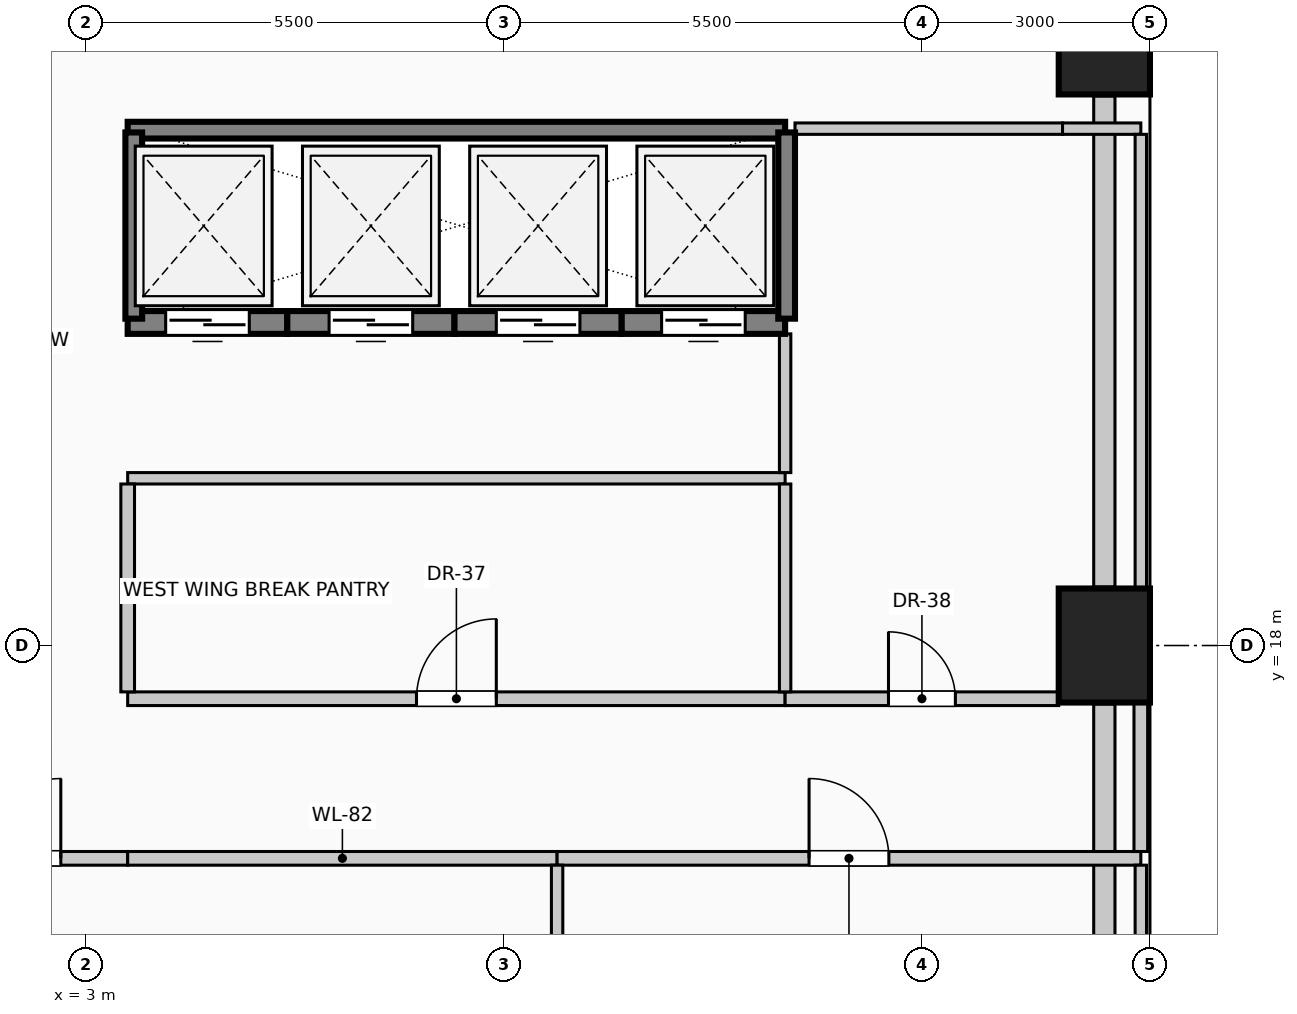
"""IFC4 building model, lengths in metres.
Left out: names, types, materials, properties, quantities, classifications, styles, units other than length and angle.
Written with IfcOpenShell. Run it as: python <this file> out.ifc"""

import sys

from ifc_helpers import new_model, si_unit, direction, frame, frame_2d, origin, origin_2d, place, context, subcontext, project, spatial, rectangle, extrude, element, fill, save


model = new_model("IFC4")
c1 = context("Model", 3, precision=1e-05, world=origin(), true_north=direction((0.0, 1.0)))
c2 = subcontext(c1, "Body", "Model", "MODEL_VIEW")
j1 = project(units=[si_unit("LENGTHUNIT", "METRE"), si_unit("PLANEANGLEUNIT", "RADIAN")], contexts=[c1])
p1 = place(None, origin())
s1 = spatial("IfcSite", under=j1, at=p1, CompositionType="ELEMENT")
p2 = place(p1, origin())
s2 = spatial("IfcBuilding", under=s1, at=p2, CompositionType="ELEMENT")
p3 = place(p2, frame((0.0, 0.0, 26.6)))
s3 = spatial("IfcBuildingStorey", under=s2, at=p3, CompositionType="ELEMENT", Elevation=26.6)
for number, where, z_axis, x_axis in (
    (1, (16.4, 18.0, 0.0), (0.0, 0.0, 1.0), (1.0, 0.0, 0.0)),
    (2, (16.4, 26.0, 0.0), (0.0, 0.0, 1.0), (1.0, 0.0, 0.0)),
):
    element("IfcColumn", number, at=place(p3, frame(where, z_axis=z_axis, x_axis=x_axis)), inside=s3, PredefinedType="COLUMN", context=c2, shape_type="SweptSolid", body=[
        extrude(rectangle(XDim=1.2, YDim=1.5, at=origin_2d()), origin(), (0.0, 0.0, 1.0), 4.0),
    ])
p4 = place(p3, frame((16.4, 17.23, 0.0), z_axis=(0.0, 0.0, 1.0), x_axis=(0.0, -1.0, 0.0)))
e3 = element("IfcWall", 3, at=p4, inside=s3, PredefinedType="SOLIDWALL", context=c2, shape_type="SweptSolid", body=[
    extrude(rectangle(XDim=6.46, YDim=0.28, at=frame_2d((3.23, 0.0))), origin(), (0.0, 0.0, 1.0), 3.0),
])
p5 = place(p4, frame((3.573, 0.0, 0.42)))
e4 = element("IfcOpeningElement", 4, at=p5, cuts=e3, PredefinedType="OPENING", context=c2, shape_type="SweptSolid", body=[
    extrude(rectangle(XDim=2.2, YDim=1.95, at=frame_2d((1.1, 0.975))), frame((0.0, 0.15, 0.0), z_axis=(0.0, -1.0, 0.0), x_axis=(1.0, 0.0, 0.0)), (0.0, 0.0, 1.0), 0.3),
])
p6 = place(p3, frame((16.4, 25.23, 0.0), z_axis=(0.0, 0.0, 1.0), x_axis=(0.0, -1.0, 0.0)))
e5 = element("IfcWall", 5, at=p6, inside=s3, PredefinedType="SOLIDWALL", context=c2, shape_type="SweptSolid", body=[
    extrude(rectangle(XDim=6.46, YDim=0.28, at=frame_2d((3.23, 0.0))), origin(), (0.0, 0.0, 1.0), 3.0),
])
p7 = place(p3, frame((5.65, 22.25, 0.0), z_axis=(0.0, 0.0, 1.0), x_axis=(-1.0, 0.0, 0.0)))
e6 = element("IfcWall", 6, at=p7, inside=s3, PredefinedType="SOLIDWALL", context=c2, shape_type="SweptSolid", body=[
    extrude(rectangle(XDim=2.1, YDim=0.3, at=frame_2d((1.05, 0.0))), origin(), (0.0, 0.0, 1.0), 4.0),
])
p8 = place(p7, frame((0.5, 0.0, 0.0)))
e7 = element("IfcOpeningElement", 7, at=p8, cuts=e6, PredefinedType="OPENING", context=c2, shape_type="SweptSolid", body=[
    extrude(rectangle(XDim=1.1, YDim=2.2, at=frame_2d((0.55, 1.1))), frame((0.0, 0.16, 0.0), z_axis=(0.0, -1.0, 0.0), x_axis=(1.0, 0.0, 0.0)), (0.0, 0.0, 1.0), 0.32),
])
p9 = place(p3, frame((7.85, 22.25, 0.0), z_axis=(0.0, 0.0, 1.0), x_axis=(-1.0, 0.0, 0.0)))
e8 = element("IfcWall", 8, at=p9, inside=s3, PredefinedType="SOLIDWALL", context=c2, shape_type="SweptSolid", body=[
    extrude(rectangle(XDim=2.2, YDim=0.3, at=frame_2d((1.1, 0.0))), origin(), (0.0, 0.0, 1.0), 4.0),
])
p10 = place(p9, frame((0.55, 0.0, 0.0)))
e9 = element("IfcOpeningElement", 9, at=p10, cuts=e8, PredefinedType="OPENING", context=c2, shape_type="SweptSolid", body=[
    extrude(rectangle(XDim=1.1, YDim=2.2, at=frame_2d((0.55, 1.1))), frame((0.0, 0.16, 0.0), z_axis=(0.0, -1.0, 0.0), x_axis=(1.0, 0.0, 0.0)), (0.0, 0.0, 1.0), 0.32),
])
p11 = place(p3, frame((10.05, 22.25, 0.0), z_axis=(0.0, 0.0, 1.0), x_axis=(-1.0, 0.0, 0.0)))
e10 = element("IfcWall", 10, at=p11, inside=s3, PredefinedType="SOLIDWALL", context=c2, shape_type="SweptSolid", body=[
    extrude(rectangle(XDim=2.2, YDim=0.3, at=frame_2d((1.1, 0.0))), origin(), (0.0, 0.0, 1.0), 4.0),
])
p12 = place(p11, frame((0.55, 0.0, 0.0)))
e11 = element("IfcOpeningElement", 11, at=p12, cuts=e10, PredefinedType="OPENING", context=c2, shape_type="SweptSolid", body=[
    extrude(rectangle(XDim=1.1, YDim=2.2, at=frame_2d((0.55, 1.1))), frame((0.0, 0.16, 0.0), z_axis=(0.0, -1.0, 0.0), x_axis=(1.0, 0.0, 0.0)), (0.0, 0.0, 1.0), 0.32),
])
p13 = place(p3, frame((12.2, 22.25, 0.0), z_axis=(0.0, 0.0, 1.0), x_axis=(-1.0, 0.0, 0.0)))
e12 = element("IfcWall", 12, at=p13, inside=s3, PredefinedType="SOLIDWALL", context=c2, shape_type="SweptSolid", body=[
    extrude(rectangle(XDim=2.15, YDim=0.3, at=frame_2d((1.075, 0.0))), origin(), (0.0, 0.0, 1.0), 4.0),
])
p14 = place(p13, frame((0.525, 0.0, 0.0)))
e13 = element("IfcOpeningElement", 13, at=p14, cuts=e12, PredefinedType="OPENING", context=c2, shape_type="SweptSolid", body=[
    extrude(rectangle(XDim=1.1, YDim=2.2, at=frame_2d((0.55, 1.1))), frame((0.0, 0.16, 0.0), z_axis=(0.0, -1.0, 0.0), x_axis=(1.0, 0.0, 0.0)), (0.0, 0.0, 1.0), 0.32),
])
p15 = place(p3, frame((3.55, 24.78, 0.0), z_axis=(0.0, 0.0, 1.0), x_axis=(1.0, 0.0, 0.0)))
e14 = element("IfcWall", 14, at=p15, inside=s3, PredefinedType="SOLIDWALL", context=c2, shape_type="SweptSolid", body=[
    extrude(rectangle(XDim=8.65, YDim=0.22, at=frame_2d((4.325, 0.0))), origin(), (0.0, 0.0, 1.0), 4.0),
])
for number, where, z_axis, x_axis in (
    (15, (3.63, 22.3, 0.0), (0.0, 0.0, 1.0), (0.0, 1.0, 0.0)),
    (16, (12.22, 22.3, 0.0), (0.0, 0.0, 1.0), (0.0, 1.0, 0.0)),
):
    element("IfcWall", number, at=place(p3, frame(where, z_axis=z_axis, x_axis=x_axis)), inside=s3, PredefinedType="SOLIDWALL", context=c2, shape_type="SweptSolid", body=[
        extrude(rectangle(XDim=2.45, YDim=0.22, at=frame_2d((1.225, 0.0))), origin(), (0.0, 0.0, 1.0), 4.0),
    ])
p16 = place(p3, frame((0.74, 15.2, 0.0), z_axis=(0.0, 0.0, 1.0), x_axis=(1.0, 0.0, 0.0)))
e17 = element("IfcWall", 17, at=p16, inside=s3, PredefinedType="PARTITIONING", context=c2, shape_type="SweptSolid", body=[
    extrude(rectangle(XDim=2.81, YDim=0.18, at=frame_2d((1.405, 0.0))), origin(), (0.0, 0.0, 1.0), 3.7),
])
p17 = place(p16, frame((0.88, 0.0, 0.0)))
e18 = element("IfcOpeningElement", 18, at=p17, cuts=e17, PredefinedType="OPENING", context=c2, shape_type="SweptSolid", body=[
    extrude(rectangle(XDim=1.05, YDim=2.15, at=frame_2d((0.525, 1.075))), frame((0.0, 0.1, 0.0), z_axis=(0.0, -1.0, 0.0), x_axis=(1.0, 0.0, 0.0)), (0.0, 0.0, 1.0), 0.2),
])
p18 = place(p3, frame((3.55, 15.2, 0.0), z_axis=(0.0, 0.0, 1.0), x_axis=(1.0, 0.0, 0.0)))
e19 = element("IfcWall", 19, at=p18, inside=s3, PredefinedType="PARTITIONING", context=c2, shape_type="SweptSolid", body=[
    extrude(rectangle(XDim=5.65, YDim=0.18, at=frame_2d((2.825, 0.0))), origin(), (0.0, 0.0, 1.0), 3.7),
])
p19 = place(p3, frame((9.2, 15.2, 0.0), z_axis=(0.0, 0.0, 1.0), x_axis=(1.0, 0.0, 0.0)))
e20 = element("IfcWall", 20, at=p19, inside=s3, PredefinedType="PARTITIONING", context=c2, shape_type="SweptSolid", body=[
    extrude(rectangle(XDim=7.68, YDim=0.18, at=frame_2d((3.84, 0.0))), origin(), (0.0, 0.0, 1.0), 3.7),
])
p20 = place(p19, frame((3.315, 0.0, 0.0)))
e21 = element("IfcOpeningElement", 21, at=p20, cuts=e20, PredefinedType="OPENING", context=c2, shape_type="SweptSolid", body=[
    extrude(rectangle(XDim=1.05, YDim=2.15, at=frame_2d((0.525, 1.075))), frame((0.0, 0.1, 0.0), z_axis=(0.0, -1.0, 0.0), x_axis=(1.0, 0.0, 0.0)), (0.0, 0.0, 1.0), 0.2),
])
p21 = place(p3, frame((3.55, 17.3, 0.0), z_axis=(0.0, 0.0, 1.0), x_axis=(1.0, 0.0, 0.0)))
e22 = element("IfcWall", 22, at=p21, inside=s3, PredefinedType="PARTITIONING", context=c2, shape_type="SweptSolid", body=[
    extrude(rectangle(XDim=8.65, YDim=0.18, at=frame_2d((4.325, 0.0))), origin(), (0.0, 0.0, 1.0), 3.7),
])
p22 = place(p21, frame((3.8, 0.0, 0.0)))
e23 = element("IfcOpeningElement", 23, at=p22, cuts=e22, PredefinedType="OPENING", context=c2, shape_type="SweptSolid", body=[
    extrude(rectangle(XDim=1.05, YDim=2.15, at=frame_2d((0.525, 1.075))), frame((0.0, 0.1, 0.0), z_axis=(0.0, -1.0, 0.0), x_axis=(1.0, 0.0, 0.0)), (0.0, 0.0, 1.0), 0.2),
])
p23 = place(p3, frame((12.2, 17.3, 0.0), z_axis=(0.0, 0.0, 1.0), x_axis=(1.0, 0.0, 0.0)))
e24 = element("IfcWall", 24, at=p23, inside=s3, PredefinedType="PARTITIONING", context=c2, shape_type="SweptSolid", body=[
    extrude(rectangle(XDim=3.6, YDim=0.18, at=frame_2d((1.8, 0.0))), origin(), (0.0, 0.0, 1.0), 3.7),
])
p24 = place(p23, frame((1.36, 0.0, 0.0)))
e25 = element("IfcOpeningElement", 25, at=p24, cuts=e24, PredefinedType="OPENING", context=c2, shape_type="SweptSolid", body=[
    extrude(rectangle(XDim=0.88, YDim=2.1, at=frame_2d((0.44, 1.05))), frame((0.0, 0.1, 0.0), z_axis=(0.0, -1.0, 0.0), x_axis=(1.0, 0.0, 0.0)), (0.0, 0.0, 1.0), 0.2),
])
p25 = place(p3, frame((3.55, 20.2, 0.0), z_axis=(0.0, 0.0, 1.0), x_axis=(1.0, 0.0, 0.0)))
e26 = element("IfcWall", 26, at=p25, inside=s3, PredefinedType="PARTITIONING", context=c2, shape_type="SweptSolid", body=[
    extrude(rectangle(XDim=8.65, YDim=0.15, at=frame_2d((4.325, 0.0))), origin(), (0.0, 0.0, 1.0), 3.7),
])
p26 = place(p3, frame((12.33, 24.8, 0.0), z_axis=(0.0, 0.0, 1.0), x_axis=(1.0, 0.0, 0.0)))
e27 = element("IfcWall", 27, at=p26, inside=s3, PredefinedType="PARTITIONING", context=c2, shape_type="SweptSolid", body=[
    extrude(rectangle(XDim=3.52, YDim=0.15, at=frame_2d((1.76, 0.0))), origin(), (0.0, 0.0, 1.0), 3.7),
])
p27 = place(p3, frame((15.85, 24.8, 0.0), z_axis=(0.0, 0.0, 1.0), x_axis=(1.0, 0.0, 0.0)))
e28 = element("IfcWall", 28, at=p27, inside=s3, PredefinedType="PARTITIONING", context=c2, shape_type="SweptSolid", body=[
    extrude(rectangle(XDim=1.03, YDim=0.15, at=frame_2d((0.515, 0.0))), origin(), (0.0, 0.0, 1.0), 3.7),
])
p28 = place(p3, frame((3.55, 17.39, 0.0), z_axis=(0.0, 0.0, 1.0), x_axis=(0.0, 1.0, 0.0)))
e29 = element("IfcWall", 29, at=p28, inside=s3, PredefinedType="PARTITIONING", context=c2, shape_type="SweptSolid", body=[
    extrude(rectangle(XDim=2.735, YDim=0.18, at=frame_2d((1.368, 0.0))), origin(), (0.0, 0.0, 1.0), 3.7),
])
p29 = place(p3, frame((9.2, 0.74, 0.0), z_axis=(0.0, 0.0, 1.0), x_axis=(0.0, 1.0, 0.0)))
e30 = element("IfcWall", 30, at=p29, inside=s3, PredefinedType="PARTITIONING", context=c2, shape_type="SweptSolid", body=[
    extrude(rectangle(XDim=14.37, YDim=0.15, at=frame_2d((7.185, 0.0))), origin(), (0.0, 0.0, 1.0), 3.7),
])
p30 = place(p3, frame((12.2, 17.39, 0.0), z_axis=(0.0, 0.0, 1.0), x_axis=(0.0, 1.0, 0.0)))
e31 = element("IfcWall", 31, at=p30, inside=s3, PredefinedType="PARTITIONING", context=c2, shape_type="SweptSolid", body=[
    extrude(rectangle(XDim=2.735, YDim=0.15, at=frame_2d((1.368, 0.0))), origin(), (0.0, 0.0, 1.0), 3.7),
])
p31 = place(p3, frame((12.2, 20.275, 0.0), z_axis=(0.0, 0.0, 1.0), x_axis=(0.0, 1.0, 0.0)))
e32 = element("IfcWall", 32, at=p31, inside=s3, PredefinedType="PARTITIONING", context=c2, shape_type="SweptSolid", body=[
    extrude(rectangle(XDim=1.825, YDim=0.15, at=frame_2d((0.913, 0.0))), origin(), (0.0, 0.0, 1.0), 3.7),
])
p32 = place(p3, frame((16.88, 10.75, 0.0), z_axis=(0.0, 0.0, 1.0), x_axis=(0.0, 1.0, 0.0)))
e33 = element("IfcWall", 33, at=p32, inside=s3, PredefinedType="PARTITIONING", context=c2, shape_type="SweptSolid", body=[
    extrude(rectangle(XDim=4.36, YDim=0.15, at=frame_2d((2.18, 0.0))), origin(), (0.0, 0.0, 1.0), 3.7),
])
p33 = place(p3, frame((16.88, 15.29, 0.0), z_axis=(0.0, 0.0, 1.0), x_axis=(0.0, 1.0, 0.0)))
e34 = element("IfcWall", 34, at=p33, inside=s3, PredefinedType="PARTITIONING", context=c2, shape_type="SweptSolid", body=[
    extrude(rectangle(XDim=1.96, YDim=0.18, at=frame_2d((0.98, 0.0))), origin(), (0.0, 0.0, 1.0), 3.7),
])
p34 = place(p3, frame((16.88, 18.75, 0.0), z_axis=(0.0, 0.0, 1.0), x_axis=(0.0, 1.0, 0.0)))
e35 = element("IfcWall", 35, at=p34, inside=s3, PredefinedType="PARTITIONING", context=c2, shape_type="SweptSolid", body=[
    extrude(rectangle(XDim=5.975, YDim=0.15, at=frame_2d((2.988, 0.0))), origin(), (0.0, 0.0, 1.0), 3.7),
])
p35 = place(p8, origin())
e36 = element("IfcDoor", 36, at=p35, inside=s3, OperationType="SLIDING_TO_LEFT", PredefinedType="DOOR", context=c2, shape_type="SweptSolid", body=[
    extrude(rectangle(XDim=1.1, YDim=2.2, at=frame_2d((0.55, 1.1))), frame((0.0, 0.025, 0.0), z_axis=(0.0, -1.0, 0.0), x_axis=(1.0, 0.0, 0.0)), (0.0, 0.0, 1.0), 0.05),
])
fill(e7, e36)
p36 = place(p10, origin())
e37 = element("IfcDoor", 37, at=p36, inside=s3, OperationType="SLIDING_TO_RIGHT", PredefinedType="DOOR", context=c2, shape_type="SweptSolid", body=[
    extrude(rectangle(XDim=1.1, YDim=2.2, at=frame_2d((0.55, 1.1))), frame((0.0, 0.025, 0.0), z_axis=(0.0, -1.0, 0.0), x_axis=(1.0, 0.0, 0.0)), (0.0, 0.0, 1.0), 0.05),
])
fill(e9, e37)
p37 = place(p12, origin())
e38 = element("IfcDoor", 38, at=p37, inside=s3, OperationType="SLIDING_TO_LEFT", PredefinedType="DOOR", context=c2, shape_type="SweptSolid", body=[
    extrude(rectangle(XDim=1.1, YDim=2.2, at=frame_2d((0.55, 1.1))), frame((0.0, 0.025, 0.0), z_axis=(0.0, -1.0, 0.0), x_axis=(1.0, 0.0, 0.0)), (0.0, 0.0, 1.0), 0.05),
])
fill(e11, e38)
p38 = place(p14, origin())
e39 = element("IfcDoor", 39, at=p38, inside=s3, OperationType="SLIDING_TO_RIGHT", PredefinedType="DOOR", context=c2, shape_type="SweptSolid", body=[
    extrude(rectangle(XDim=1.1, YDim=2.2, at=frame_2d((0.55, 1.1))), frame((0.0, 0.025, 0.0), z_axis=(0.0, -1.0, 0.0), x_axis=(1.0, 0.0, 0.0)), (0.0, 0.0, 1.0), 0.05),
])
fill(e13, e39)
p39 = place(p17, origin())
e40 = element("IfcDoor", 40, at=p39, inside=s3, OperationType="SINGLE_SWING_RIGHT", PredefinedType="DOOR", context=c2, shape_type="SweptSolid", body=[
    extrude(rectangle(XDim=1.05, YDim=2.15, at=frame_2d((0.525, 1.075))), frame((0.0, 0.025, 0.0), z_axis=(0.0, -1.0, 0.0), x_axis=(1.0, 0.0, 0.0)), (0.0, 0.0, 1.0), 0.05),
])
fill(e18, e40)
p40 = place(p20, origin())
e41 = element("IfcDoor", 41, at=p40, inside=s3, OperationType="SINGLE_SWING_LEFT", PredefinedType="DOOR", context=c2, shape_type="SweptSolid", body=[
    extrude(rectangle(XDim=1.05, YDim=2.15, at=frame_2d((0.525, 1.075))), frame((0.0, 0.025, 0.0), z_axis=(0.0, -1.0, 0.0), x_axis=(1.0, 0.0, 0.0)), (0.0, 0.0, 1.0), 0.05),
])
fill(e21, e41)
p41 = place(p22, origin())
e42 = element("IfcDoor", 42, at=p41, inside=s3, OperationType="SINGLE_SWING_RIGHT", PredefinedType="DOOR", context=c2, shape_type="SweptSolid", body=[
    extrude(rectangle(XDim=1.05, YDim=2.15, at=frame_2d((0.525, 1.075))), frame((0.0, 0.025, 0.0), z_axis=(0.0, -1.0, 0.0), x_axis=(1.0, 0.0, 0.0)), (0.0, 0.0, 1.0), 0.05),
])
fill(e23, e42)
p42 = place(p24, origin())
e43 = element("IfcDoor", 43, at=p42, inside=s3, OperationType="SINGLE_SWING_LEFT", PredefinedType="DOOR", context=c2, shape_type="SweptSolid", body=[
    extrude(rectangle(XDim=0.88, YDim=2.1, at=frame_2d((0.44, 1.05))), frame((0.0, 0.025, 0.0), z_axis=(0.0, -1.0, 0.0), x_axis=(1.0, 0.0, 0.0)), (0.0, 0.0, 1.0), 0.05),
])
fill(e25, e43)
save(model, sys.argv[1])
